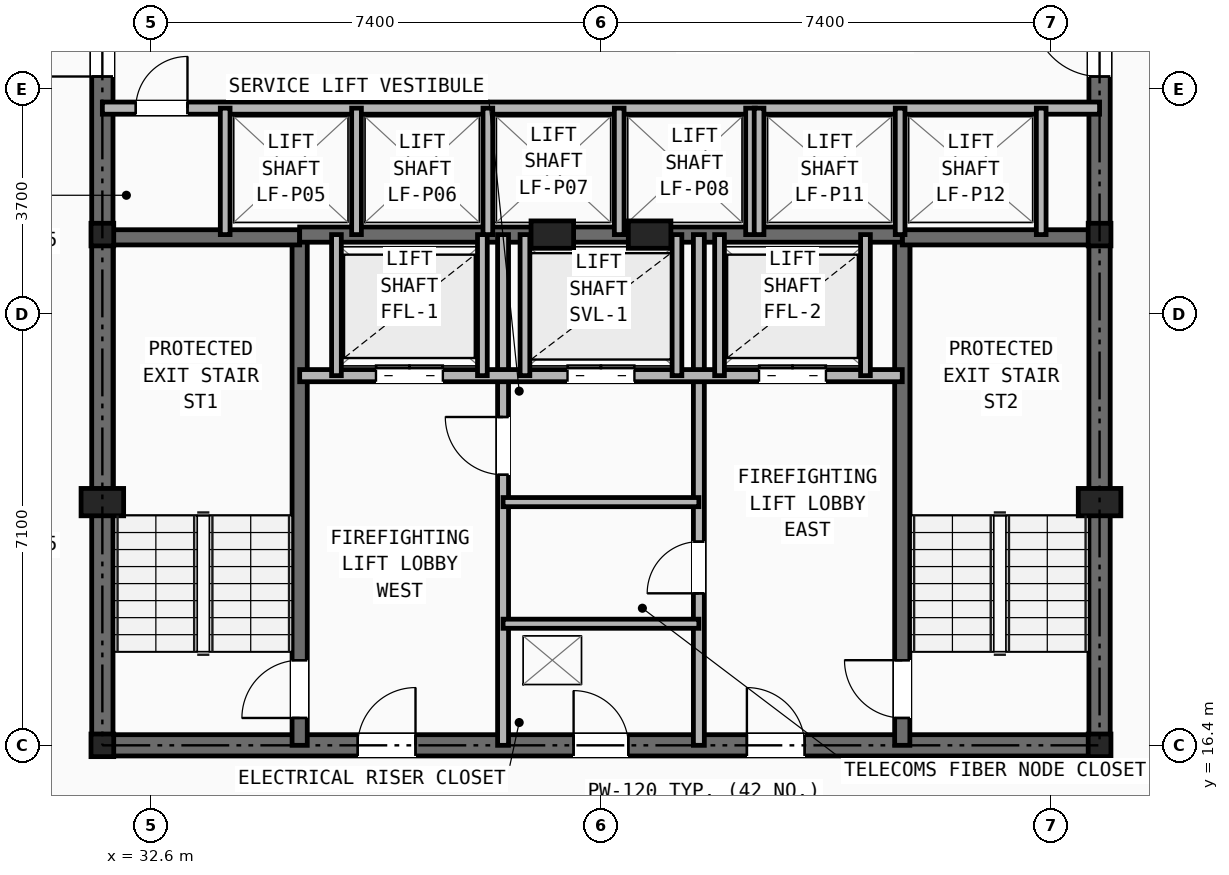
"""IFC4 building model, lengths in metres.
Left out: names, types, materials, properties, quantities, classifications, styles, units other than length and angle.
Written with IfcOpenShell. Run it as: python <this file> out.ifc"""

import sys

from ifc_helpers import new_model, si_unit, direction, frame, frame_2d, origin, origin_2d, place, context, subcontext, project, spatial, rectangle, i_section, extrude, element, fill, save


model = new_model("IFC4")
c1 = context("Model", 3, precision=1e-05, world=origin(), true_north=direction((0.0, 1.0)))
c2 = subcontext(c1, "Body", "Model", "MODEL_VIEW")
j1 = project(units=[si_unit("LENGTHUNIT", "METRE"), si_unit("PLANEANGLEUNIT", "RADIAN")], contexts=[c1])
p1 = place(None, origin())
s1 = spatial("IfcSite", under=j1, at=p1, CompositionType="ELEMENT")
p2 = place(p1, origin())
s2 = spatial("IfcBuilding", under=s1, at=p2, CompositionType="ELEMENT")
p3 = place(p2, frame((0.0, 0.0, 52.8)))
s3 = spatial("IfcBuildingStorey", under=s2, at=p3, CompositionType="ELEMENT", Elevation=52.8)
for number, where, z_axis, x_axis in (
    (1, (31.8, 16.4, 0.0), (0.0, 0.0, 1.0), (1.0, 0.0, 0.0)),
    (2, (48.2, 16.4, 0.0), (0.0, 0.0, 1.0), (1.0, 0.0, 0.0)),
    (3, (31.8, 24.8, 0.0), (0.0, 0.0, 1.0), (1.0, 0.0, 0.0)),
    (4, (48.2, 24.8, 0.0), (0.0, 0.0, 1.0), (1.0, 0.0, 0.0)),
):
    element("IfcColumn", number, at=place(p3, frame(where, z_axis=z_axis, x_axis=x_axis)), inside=s3, PredefinedType="COLUMN", context=c2, shape_type="SweptSolid", body=[
        extrude(i_section(OverallWidth=0.374, OverallDepth=0.372, WebThickness=0.016, FlangeThickness=0.026, at=origin_2d()), origin(), (0.0, 0.0, 1.0), 3.2),
    ])
for number, where, z_axis, x_axis in (
    (5, (31.8, 20.4, 0.0), (0.0, 0.0, 1.0), (1.0, 0.0, 0.0)),
    (6, (48.2, 20.4, 0.0), (0.0, 0.0, 1.0), (1.0, 0.0, 0.0)),
    (7, (39.2, 24.8, 0.0), (0.0, 0.0, 1.0), (1.0, 0.0, 0.0)),
    (8, (40.8, 24.8, 0.0), (0.0, 0.0, 1.0), (1.0, 0.0, 0.0)),
):
    element("IfcColumn", number, at=place(p3, frame(where, z_axis=z_axis, x_axis=x_axis)), inside=s3, PredefinedType="PILASTER", context=c2, shape_type="SweptSolid", body=[
        extrude(rectangle(XDim=0.7, YDim=0.45, at=origin_2d()), origin(), (0.0, 0.0, 1.0), 3.2),
    ])
p4 = place(p3, frame((31.8, 16.4, 0.0), z_axis=(0.0, 0.0, 1.0), x_axis=(1.0, 0.0, 0.0)))
e9 = element("IfcWall", 9, at=p4, inside=s3, PredefinedType="SHEAR", context=c2, shape_type="SweptSolid", body=[
    extrude(rectangle(XDim=16.4, YDim=0.35, at=frame_2d((8.2, 0.0))), origin(), (0.0, 0.0, 1.0), 2.98),
])
p5 = place(p4, frame((7.75, 0.0, 0.0)))
e10 = element("IfcOpeningElement", 10, at=p5, cuts=e9, PredefinedType="OPENING", context=c2, shape_type="SweptSolid", body=[
    extrude(rectangle(XDim=0.9, YDim=2.1, at=frame_2d((0.45, 1.05))), frame((0.0, 0.185, 0.0), z_axis=(0.0, -1.0, 0.0), x_axis=(1.0, 0.0, 0.0)), (0.0, 0.0, 1.0), 0.37),
])
p6 = place(p4, frame((4.2, 0.0, 0.0)))
e11 = element("IfcOpeningElement", 11, at=p6, cuts=e9, PredefinedType="OPENING", context=c2, shape_type="SweptSolid", body=[
    extrude(rectangle(XDim=0.95, YDim=2.1, at=frame_2d((0.475, 1.05))), frame((0.0, 0.185, 0.0), z_axis=(0.0, -1.0, 0.0), x_axis=(1.0, 0.0, 0.0)), (0.0, 0.0, 1.0), 0.37),
])
p7 = place(p4, frame((10.6, 0.0, 0.0)))
e12 = element("IfcOpeningElement", 12, at=p7, cuts=e9, PredefinedType="OPENING", context=c2, shape_type="SweptSolid", body=[
    extrude(rectangle(XDim=0.95, YDim=2.1, at=frame_2d((0.475, 1.05))), frame((0.0, 0.185, 0.0), z_axis=(0.0, -1.0, 0.0), x_axis=(1.0, 0.0, 0.0)), (0.0, 0.0, 1.0), 0.37),
])
p8 = place(p3, frame((31.8, 16.4, 0.0), z_axis=(0.0, 0.0, 1.0), x_axis=(0.0, 1.0, 0.0)))
e13 = element("IfcWall", 13, at=p8, inside=s3, PredefinedType="SHEAR", context=c2, shape_type="SweptSolid", body=[
    extrude(rectangle(XDim=14.8, YDim=0.35, at=frame_2d((7.4, 0.0))), origin(), (0.0, 0.0, 1.0), 2.98),
])
p9 = place(p8, frame((11.0, 0.0, 0.0)))
e14 = element("IfcOpeningElement", 14, at=p9, cuts=e13, PredefinedType="OPENING", context=c2, shape_type="SweptSolid", body=[
    extrude(rectangle(XDim=1.1, YDim=2.15, at=frame_2d((0.55, 1.075))), frame((0.0, 0.185, 0.0), z_axis=(0.0, -1.0, 0.0), x_axis=(1.0, 0.0, 0.0)), (0.0, 0.0, 1.0), 0.37),
])
p10 = place(p3, frame((48.2, 16.4, 0.0), z_axis=(0.0, 0.0, 1.0), x_axis=(0.0, 1.0, 0.0)))
e15 = element("IfcWall", 15, at=p10, inside=s3, PredefinedType="SHEAR", context=c2, shape_type="SweptSolid", body=[
    extrude(rectangle(XDim=14.8, YDim=0.35, at=frame_2d((7.4, 0.0))), origin(), (0.0, 0.0, 1.0), 2.98),
])
p11 = place(p10, frame((11.0, 0.0, 0.0)))
e16 = element("IfcOpeningElement", 16, at=p11, cuts=e15, PredefinedType="OPENING", context=c2, shape_type="SweptSolid", body=[
    extrude(rectangle(XDim=1.1, YDim=2.15, at=frame_2d((0.55, 1.075))), frame((0.0, 0.185, 0.0), z_axis=(0.0, -1.0, 0.0), x_axis=(1.0, 0.0, 0.0)), (0.0, 0.0, 1.0), 0.37),
])
p12 = place(p3, frame((35.045, 16.4, 0.0), z_axis=(0.0, 0.0, 1.0), x_axis=(0.0, 1.0, 0.0)))
e17 = element("IfcWall", 17, at=p12, inside=s3, PredefinedType="SHEAR", context=c2, shape_type="SweptSolid", body=[
    extrude(rectangle(XDim=8.4, YDim=0.25, at=frame_2d((4.2, 0.0))), origin(), (0.0, 0.0, 1.0), 2.98),
])
p13 = place(p12, frame((0.45, 0.0, 0.0)))
e18 = element("IfcOpeningElement", 18, at=p13, cuts=e17, PredefinedType="OPENING", context=c2, shape_type="SweptSolid", body=[
    extrude(rectangle(XDim=0.95, YDim=2.1, at=frame_2d((0.475, 1.05))), frame((0.0, 0.135, 0.0), z_axis=(0.0, -1.0, 0.0), x_axis=(1.0, 0.0, 0.0)), (0.0, 0.0, 1.0), 0.27),
])
p14 = place(p3, frame((31.8, 24.755, 0.0), z_axis=(0.0, 0.0, 1.0), x_axis=(1.0, 0.0, 0.0)))
e19 = element("IfcWall", 19, at=p14, inside=s3, PredefinedType="SHEAR", context=c2, shape_type="SweptSolid", body=[
    extrude(rectangle(XDim=3.245, YDim=0.25, at=frame_2d((1.623, 0.0))), origin(), (0.0, 0.0, 1.0), 2.98),
])
p15 = place(p3, frame((44.955, 16.4, 0.0), z_axis=(0.0, 0.0, 1.0), x_axis=(0.0, 1.0, 0.0)))
e20 = element("IfcWall", 20, at=p15, inside=s3, PredefinedType="SHEAR", context=c2, shape_type="SweptSolid", body=[
    extrude(rectangle(XDim=8.4, YDim=0.25, at=frame_2d((4.2, 0.0))), origin(), (0.0, 0.0, 1.0), 2.98),
])
p16 = place(p15, frame((0.45, 0.0, 0.0)))
e21 = element("IfcOpeningElement", 21, at=p16, cuts=e20, PredefinedType="OPENING", context=c2, shape_type="SweptSolid", body=[
    extrude(rectangle(XDim=0.95, YDim=2.1, at=frame_2d((0.475, 1.05))), frame((0.0, 0.135, 0.0), z_axis=(0.0, -1.0, 0.0), x_axis=(1.0, 0.0, 0.0)), (0.0, 0.0, 1.0), 0.27),
])
p17 = place(p3, frame((44.955, 24.755, 0.0), z_axis=(0.0, 0.0, 1.0), x_axis=(1.0, 0.0, 0.0)))
e22 = element("IfcWall", 22, at=p17, inside=s3, PredefinedType="SHEAR", context=c2, shape_type="SweptSolid", body=[
    extrude(rectangle(XDim=3.245, YDim=0.25, at=frame_2d((1.623, 0.0))), origin(), (0.0, 0.0, 1.0), 2.98),
])
p18 = place(p3, frame((35.045, 24.8, 0.0), z_axis=(0.0, 0.0, 1.0), x_axis=(1.0, 0.0, 0.0)))
e23 = element("IfcWall", 23, at=p18, inside=s3, PredefinedType="SHEAR", context=c2, shape_type="SweptSolid", body=[
    extrude(rectangle(XDim=9.91, YDim=0.25, at=frame_2d((4.955, 0.0))), origin(), (0.0, 0.0, 1.0), 2.98),
])
p19 = place(p3, frame((38.39, 16.4, 0.0), z_axis=(0.0, 0.0, 1.0), x_axis=(0.0, 1.0, 0.0)))
e24 = element("IfcWall", 24, at=p19, inside=s3, PredefinedType="PARTITIONING", context=c2, shape_type="SweptSolid", body=[
    extrude(rectangle(XDim=8.4, YDim=0.18, at=frame_2d((4.2, 0.0))), origin(), (0.0, 0.0, 1.0), 2.431),
])
p20 = place(p19, frame((4.45, 0.0, 0.0)))
e25 = element("IfcOpeningElement", 25, at=p20, cuts=e24, PredefinedType="OPENING", context=c2, shape_type="SweptSolid", body=[
    extrude(rectangle(XDim=0.95, YDim=2.1, at=frame_2d((0.475, 1.05))), frame((0.0, 0.1, 0.0), z_axis=(0.0, -1.0, 0.0), x_axis=(1.0, 0.0, 0.0)), (0.0, 0.0, 1.0), 0.2),
])
p21 = place(p3, frame((41.61, 16.4, 0.0), z_axis=(0.0, 0.0, 1.0), x_axis=(0.0, 1.0, 0.0)))
e26 = element("IfcWall", 26, at=p21, inside=s3, PredefinedType="PARTITIONING", context=c2, shape_type="SweptSolid", body=[
    extrude(rectangle(XDim=8.4, YDim=0.18, at=frame_2d((4.2, 0.0))), origin(), (0.0, 0.0, 1.0), 2.431),
])
p22 = place(p21, frame((2.5, 0.0, 0.0)))
e27 = element("IfcOpeningElement", 27, at=p22, cuts=e26, PredefinedType="OPENING", context=c2, shape_type="SweptSolid", body=[
    extrude(rectangle(XDim=0.85, YDim=2.05, at=frame_2d((0.425, 1.025))), frame((0.0, 0.1, 0.0), z_axis=(0.0, -1.0, 0.0), x_axis=(1.0, 0.0, 0.0)), (0.0, 0.0, 1.0), 0.2),
])
p23 = place(p3, frame((35.045, 22.48, 0.0), z_axis=(0.0, 0.0, 1.0), x_axis=(1.0, 0.0, 0.0)))
e28 = element("IfcWall", 28, at=p23, inside=s3, PredefinedType="SOLIDWALL", context=c2, shape_type="SweptSolid", body=[
    extrude(rectangle(XDim=9.91, YDim=0.2, at=frame_2d((4.955, 0.0))), origin(), (0.0, 0.0, 1.0), 2.98),
])
p24 = place(p23, frame((1.255, 0.0, 0.0)))
e29 = element("IfcOpeningElement", 29, at=p24, cuts=e28, PredefinedType="OPENING", context=c2, shape_type="SweptSolid", body=[
    extrude(rectangle(XDim=1.1, YDim=2.15, at=frame_2d((0.55, 1.075))), frame((0.0, 0.11, 0.0), z_axis=(0.0, -1.0, 0.0), x_axis=(1.0, 0.0, 0.0)), (0.0, 0.0, 1.0), 0.22),
])
p25 = place(p23, frame((7.555, 0.0, 0.0)))
e30 = element("IfcOpeningElement", 30, at=p25, cuts=e28, PredefinedType="OPENING", context=c2, shape_type="SweptSolid", body=[
    extrude(rectangle(XDim=1.1, YDim=2.15, at=frame_2d((0.55, 1.075))), frame((0.0, 0.11, 0.0), z_axis=(0.0, -1.0, 0.0), x_axis=(1.0, 0.0, 0.0)), (0.0, 0.0, 1.0), 0.22),
])
p26 = place(p23, frame((4.405, 0.0, 0.0)))
e31 = element("IfcOpeningElement", 31, at=p26, cuts=e28, PredefinedType="OPENING", context=c2, shape_type="SweptSolid", body=[
    extrude(rectangle(XDim=1.1, YDim=2.15, at=frame_2d((0.55, 1.075))), frame((0.0, 0.11, 0.0), z_axis=(0.0, -1.0, 0.0), x_axis=(1.0, 0.0, 0.0)), (0.0, 0.0, 1.0), 0.22),
])
for number, where, z_axis, x_axis in (
    (32, (38.39, 18.4, 0.0), (0.0, 0.0, 1.0), (1.0, 0.0, 0.0)),
    (33, (38.39, 20.4, 0.0), (0.0, 0.0, 1.0), (1.0, 0.0, 0.0)),
):
    element("IfcWall", number, at=place(p3, frame(where, z_axis=z_axis, x_axis=x_axis)), inside=s3, PredefinedType="PARTITIONING", context=c2, shape_type="SweptSolid", body=[
        extrude(rectangle(XDim=3.22, YDim=0.15, at=frame_2d((1.61, 0.0))), origin(), (0.0, 0.0, 1.0), 2.98),
    ])
for number, where, z_axis, x_axis in (
    (34, (35.65, 22.48, 0.0), (0.0, 0.0, 1.0), (0.0, 1.0, 0.0)),
    (35, (38.05, 22.48, 0.0), (0.0, 0.0, 1.0), (0.0, 1.0, 0.0)),
    (36, (41.95, 22.48, 0.0), (0.0, 0.0, 1.0), (0.0, 1.0, 0.0)),
    (37, (44.35, 22.48, 0.0), (0.0, 0.0, 1.0), (0.0, 1.0, 0.0)),
    (38, (38.75, 22.48, 0.0), (0.0, 0.0, 1.0), (0.0, 1.0, 0.0)),
    (39, (41.25, 22.48, 0.0), (0.0, 0.0, 1.0), (0.0, 1.0, 0.0)),
):
    element("IfcWall", number, at=place(p3, frame(where, z_axis=z_axis, x_axis=x_axis)), inside=s3, PredefinedType="SOLIDWALL", context=c2, shape_type="SweptSolid", body=[
        extrude(rectangle(XDim=2.32, YDim=0.16, at=frame_2d((1.16, 0.0))), origin(), (0.0, 0.0, 1.0), 2.98),
    ])
p27 = place(p3, frame((31.8, 26.88, 0.0), z_axis=(0.0, 0.0, 1.0), x_axis=(1.0, 0.0, 0.0)))
e40 = element("IfcWall", 40, at=p27, inside=s3, PredefinedType="SOLIDWALL", context=c2, shape_type="SweptSolid", body=[
    extrude(rectangle(XDim=16.4, YDim=0.2, at=frame_2d((8.2, 0.0))), origin(), (0.0, 0.0, 1.0), 2.431),
])
p28 = place(p27, frame((0.55, 0.0, 0.0)))
e41 = element("IfcOpeningElement", 41, at=p28, cuts=e40, PredefinedType="OPENING", context=c2, shape_type="SweptSolid", body=[
    extrude(rectangle(XDim=0.85, YDim=2.05, at=frame_2d((0.425, 1.025))), frame((0.0, 0.11, 0.0), z_axis=(0.0, -1.0, 0.0), x_axis=(1.0, 0.0, 0.0)), (0.0, 0.0, 1.0), 0.22),
])
for number, where, z_axis, x_axis in (
    (42, (33.82, 24.8, 0.0), (0.0, 0.0, 1.0), (0.0, 1.0, 0.0)),
    (43, (35.98, 24.8, 0.0), (0.0, 0.0, 1.0), (0.0, 1.0, 0.0)),
    (44, (38.14, 24.8, 0.0), (0.0, 0.0, 1.0), (0.0, 1.0, 0.0)),
    (45, (40.3, 24.8, 0.0), (0.0, 0.0, 1.0), (0.0, 1.0, 0.0)),
    (46, (42.46, 24.8, 0.0), (0.0, 0.0, 1.0), (0.0, 1.0, 0.0)),
    (47, (42.6, 24.8, 0.0), (0.0, 0.0, 1.0), (0.0, 1.0, 0.0)),
    (48, (44.92, 24.8, 0.0), (0.0, 0.0, 1.0), (0.0, 1.0, 0.0)),
    (49, (47.24, 24.8, 0.0), (0.0, 0.0, 1.0), (0.0, 1.0, 0.0)),
):
    element("IfcWall", number, at=place(p3, frame(where, z_axis=z_axis, x_axis=x_axis)), inside=s3, PredefinedType="SOLIDWALL", context=c2, shape_type="SweptSolid", body=[
        extrude(rectangle(XDim=2.08, YDim=0.16, at=frame_2d((1.04, 0.0))), origin(), (0.0, 0.0, 1.0), 2.98),
    ])
p29 = place(p5, origin())
e50 = element("IfcDoor", 50, at=p29, inside=s3, OperationType="SINGLE_SWING_LEFT", PredefinedType="DOOR", context=c2, shape_type="SweptSolid", body=[
    extrude(rectangle(XDim=0.9, YDim=2.1, at=frame_2d((0.45, 1.05))), frame((0.0, 0.025, 0.0), z_axis=(0.0, -1.0, 0.0), x_axis=(1.0, 0.0, 0.0)), (0.0, 0.0, 1.0), 0.05),
])
fill(e10, e50)
p30 = place(p22, origin())
e51 = element("IfcDoor", 51, at=p30, inside=s3, OperationType="SINGLE_SWING_LEFT", PredefinedType="DOOR", context=c2, shape_type="SweptSolid", body=[
    extrude(rectangle(XDim=0.85, YDim=2.05, at=frame_2d((0.425, 1.025))), frame((0.0, 0.025, 0.0), z_axis=(0.0, -1.0, 0.0), x_axis=(1.0, 0.0, 0.0)), (0.0, 0.0, 1.0), 0.05),
])
fill(e27, e51)
p31 = place(p20, origin())
e52 = element("IfcDoor", 52, at=p31, inside=s3, OperationType="SINGLE_SWING_RIGHT", PredefinedType="DOOR", context=c2, shape_type="SweptSolid", body=[
    extrude(rectangle(XDim=0.95, YDim=2.1, at=frame_2d((0.475, 1.05))), frame((0.0, 0.025, 0.0), z_axis=(0.0, -1.0, 0.0), x_axis=(1.0, 0.0, 0.0)), (0.0, 0.0, 1.0), 0.05),
])
fill(e25, e52)
p32 = place(p13, origin())
e53 = element("IfcDoor", 53, at=p32, inside=s3, OperationType="SINGLE_SWING_LEFT", PredefinedType="DOOR", context=c2, shape_type="SweptSolid", body=[
    extrude(rectangle(XDim=0.95, YDim=2.1, at=frame_2d((0.475, 1.05))), frame((0.0, 0.025, 0.0), z_axis=(0.0, -1.0, 0.0), x_axis=(1.0, 0.0, 0.0)), (0.0, 0.0, 1.0), 0.05),
])
fill(e18, e53)
p33 = place(p16, origin())
e54 = element("IfcDoor", 54, at=p33, inside=s3, OperationType="SINGLE_SWING_RIGHT", PredefinedType="DOOR", context=c2, shape_type="SweptSolid", body=[
    extrude(rectangle(XDim=0.95, YDim=2.1, at=frame_2d((0.475, 1.05))), frame((0.0, 0.025, 0.0), z_axis=(0.0, -1.0, 0.0), x_axis=(1.0, 0.0, 0.0)), (0.0, 0.0, 1.0), 0.05),
])
fill(e21, e54)
p34 = place(p6, origin())
e55 = element("IfcDoor", 55, at=p34, inside=s3, OperationType="SINGLE_SWING_RIGHT", PredefinedType="DOOR", context=c2, shape_type="SweptSolid", body=[
    extrude(rectangle(XDim=0.95, YDim=2.1, at=frame_2d((0.475, 1.05))), frame((0.0, 0.025, 0.0), z_axis=(0.0, -1.0, 0.0), x_axis=(1.0, 0.0, 0.0)), (0.0, 0.0, 1.0), 0.05),
])
fill(e11, e55)
p35 = place(p7, origin())
e56 = element("IfcDoor", 56, at=p35, inside=s3, OperationType="SINGLE_SWING_LEFT", PredefinedType="DOOR", context=c2, shape_type="SweptSolid", body=[
    extrude(rectangle(XDim=0.95, YDim=2.1, at=frame_2d((0.475, 1.05))), frame((0.0, 0.025, 0.0), z_axis=(0.0, -1.0, 0.0), x_axis=(1.0, 0.0, 0.0)), (0.0, 0.0, 1.0), 0.05),
])
fill(e12, e56)
p36 = place(p24, origin())
e57 = element("IfcDoor", 57, at=p36, inside=s3, OperationType="DOUBLE_DOOR_SLIDING", PredefinedType="DOOR", context=c2, shape_type="SweptSolid", body=[
    extrude(rectangle(XDim=1.1, YDim=2.15, at=frame_2d((0.55, 1.075))), frame((0.0, 0.025, 0.0), z_axis=(0.0, -1.0, 0.0), x_axis=(1.0, 0.0, 0.0)), (0.0, 0.0, 1.0), 0.05),
])
fill(e29, e57)
p37 = place(p25, origin())
e58 = element("IfcDoor", 58, at=p37, inside=s3, OperationType="DOUBLE_DOOR_SLIDING", PredefinedType="DOOR", context=c2, shape_type="SweptSolid", body=[
    extrude(rectangle(XDim=1.1, YDim=2.15, at=frame_2d((0.55, 1.075))), frame((0.0, 0.025, 0.0), z_axis=(0.0, -1.0, 0.0), x_axis=(1.0, 0.0, 0.0)), (0.0, 0.0, 1.0), 0.05),
])
fill(e30, e58)
p38 = place(p26, origin())
e59 = element("IfcDoor", 59, at=p38, inside=s3, OperationType="DOUBLE_DOOR_SLIDING", PredefinedType="DOOR", context=c2, shape_type="SweptSolid", body=[
    extrude(rectangle(XDim=1.1, YDim=2.15, at=frame_2d((0.55, 1.075))), frame((0.0, 0.025, 0.0), z_axis=(0.0, -1.0, 0.0), x_axis=(1.0, 0.0, 0.0)), (0.0, 0.0, 1.0), 0.05),
])
fill(e31, e59)
p39 = place(p28, origin())
e60 = element("IfcDoor", 60, at=p39, inside=s3, OperationType="SINGLE_SWING_RIGHT", PredefinedType="DOOR", context=c2, shape_type="SweptSolid", body=[
    extrude(rectangle(XDim=0.85, YDim=2.05, at=frame_2d((0.425, 1.025))), frame((0.0, 0.025, 0.0), z_axis=(0.0, -1.0, 0.0), x_axis=(1.0, 0.0, 0.0)), (0.0, 0.0, 1.0), 0.05),
])
fill(e41, e60)
p40 = place(p9, origin())
e61 = element("IfcDoor", 61, at=p40, inside=s3, OperationType="SINGLE_SWING_LEFT", PredefinedType="DOOR", context=c2, shape_type="SweptSolid", body=[
    extrude(rectangle(XDim=1.1, YDim=2.15, at=frame_2d((0.55, 1.075))), frame((0.0, 0.025, 0.0), z_axis=(0.0, -1.0, 0.0), x_axis=(1.0, 0.0, 0.0)), (0.0, 0.0, 1.0), 0.05),
])
fill(e14, e61)
p41 = place(p11, origin())
e62 = element("IfcDoor", 62, at=p41, inside=s3, OperationType="SINGLE_SWING_RIGHT", PredefinedType="DOOR", context=c2, shape_type="SweptSolid", body=[
    extrude(rectangle(XDim=1.1, YDim=2.15, at=frame_2d((0.55, 1.075))), frame((0.0, 0.025, 0.0), z_axis=(0.0, -1.0, 0.0), x_axis=(1.0, 0.0, 0.0)), (0.0, 0.0, 1.0), 0.05),
])
fill(e16, e62)
save(model, sys.argv[1])
